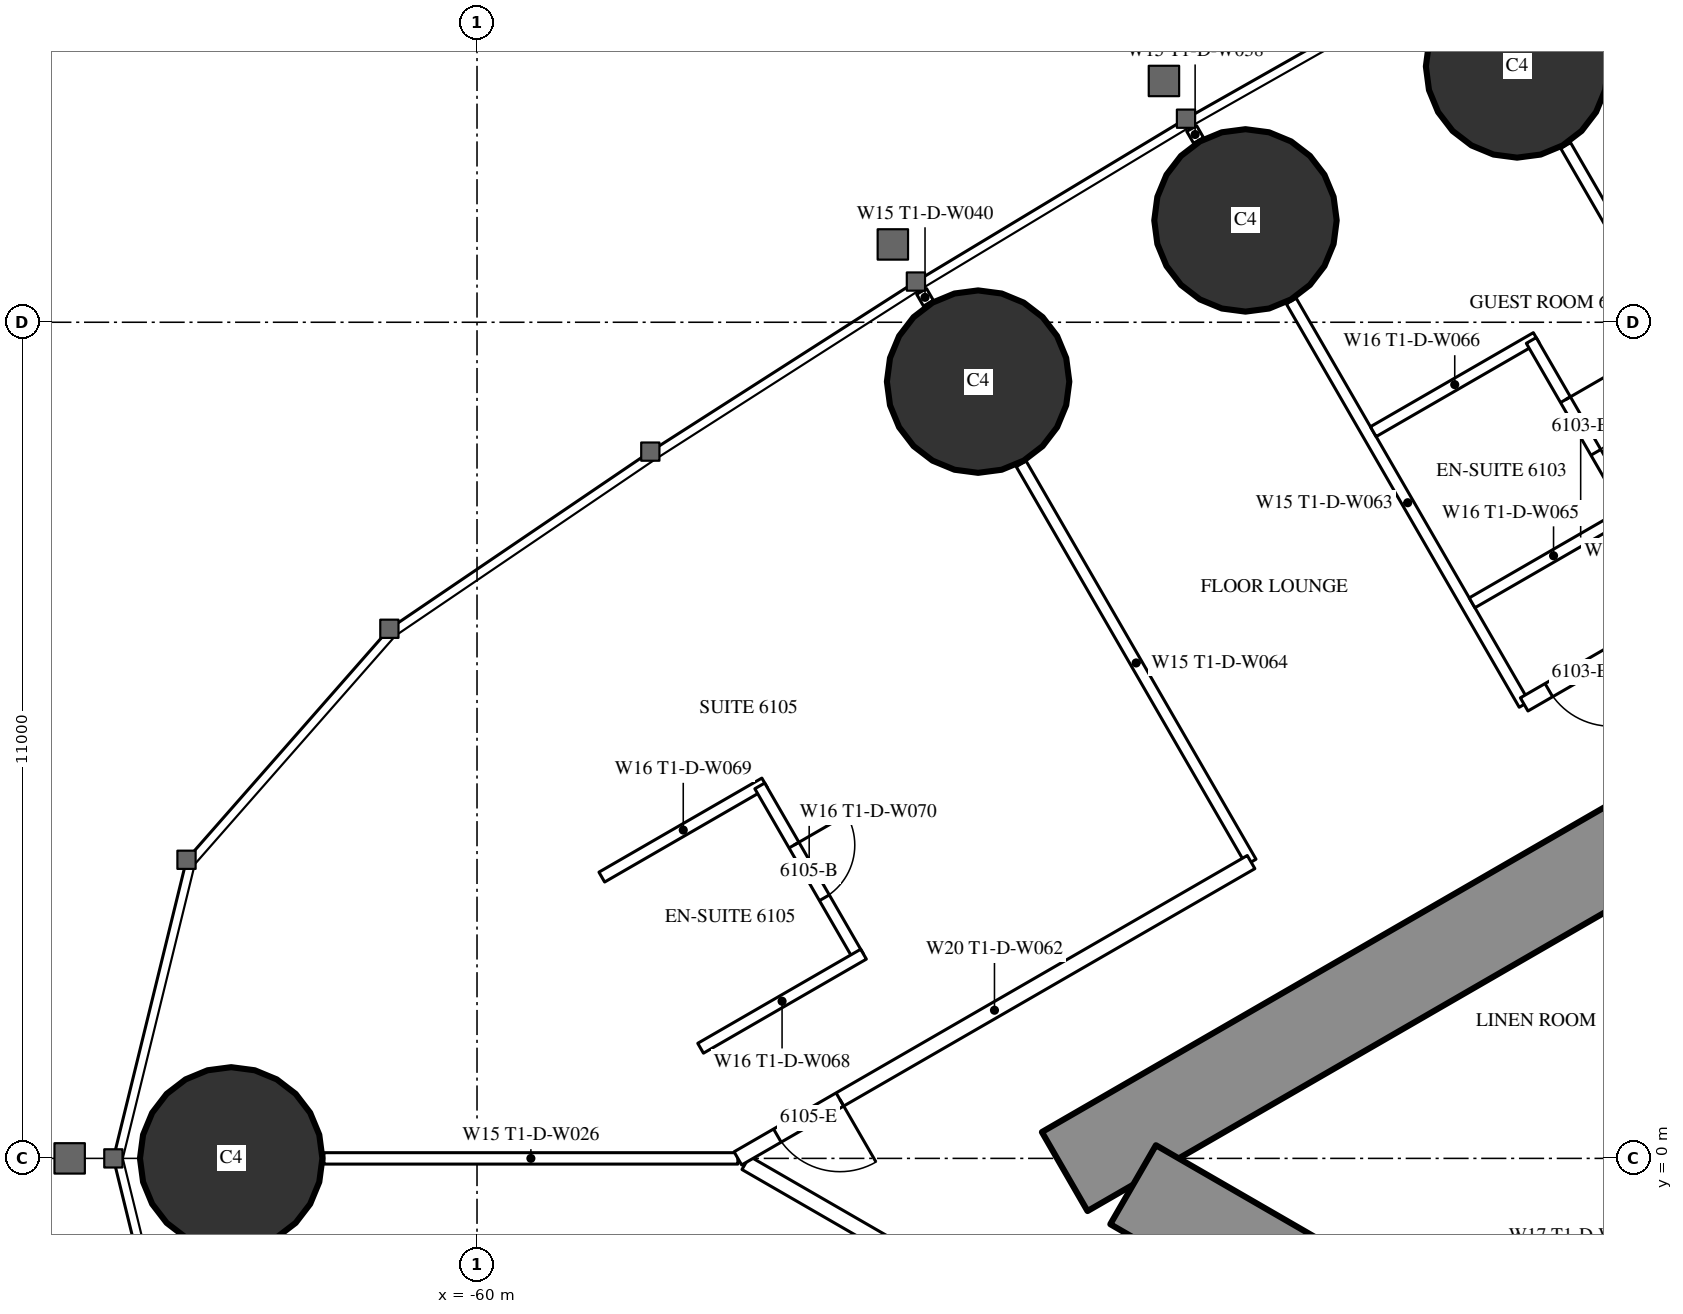
"""IFC4 building model, lengths in metres.
Left out: names, types, materials, properties, quantities, classifications, styles, units other than length and angle.
Written with IfcOpenShell. Run it as: python <this file> out.ifc"""

import sys

from ifc_helpers import new_model, si_unit, direction, frame, frame_2d, origin, origin_2d, place, context, subcontext, project, spatial, rectangle, circle, extrude, element, fill, save


model = new_model("IFC4")
c1 = context("Model", 3, precision=1e-05, world=origin(), true_north=direction((0.0, 1.0)))
c2 = subcontext(c1, "Body", "Model", "MODEL_VIEW")
j1 = project(units=[si_unit("LENGTHUNIT", "METRE"), si_unit("PLANEANGLEUNIT", "RADIAN")], contexts=[c1])
p1 = place(None, origin())
s1 = spatial("IfcSite", under=j1, at=p1, CompositionType="ELEMENT")
p2 = place(p1, origin())
s2 = spatial("IfcBuilding", under=s1, at=p2, CompositionType="ELEMENT")
p3 = place(p2, frame((0.0, 0.0, 229.7)))
s3 = spatial("IfcBuildingStorey", under=s2, at=p3, CompositionType="ELEMENT", Elevation=229.7)
for number, where, z_axis, x_axis in (
    (1, (-63.234, 0.0, 0.0), (0.0, 0.0, 1.0), (1.0, 0.0, 0.0)),
    (2, (-46.317, 14.365, 0.0), (0.0, 0.0, 1.0), (1.0, 0.0, 0.0)),
    (3, (-49.89, 12.34, 0.0), (0.0, 0.0, 1.0), (1.0, 0.0, 0.0)),
    (4, (-53.408, 10.219, 0.0), (0.0, 0.0, 1.0), (1.0, 0.0, 0.0)),
):
    element("IfcColumn", number, at=place(p3, frame(where, z_axis=z_axis, x_axis=x_axis)), inside=s3, PredefinedType="COLUMN", context=c2, shape_type="SweptSolid", body=[
        extrude(circle(Radius=1.2, at=origin_2d()), origin(), (0.0, 0.0, 1.0), 3.6),
    ])
p4 = place(p3, frame((-27.2, 14.3, 0.0), z_axis=(0.0, 0.0, 1.0), x_axis=(-0.866026593062, -0.499997940104, 0.0)))
e5 = element("IfcWall", 5, at=p4, inside=s3, PredefinedType="SHEAR", context=c2, shape_type="SweptSolid", body=[
    extrude(rectangle(XDim=28.946, YDim=1.2, at=frame_2d((14.473, 0.0))), origin(), (0.0, 0.0, 1.0), 3.6),
])
p5 = place(p4, frame((4.6, 0.0, 0.0)))
e6 = element("IfcOpeningElement", 6, at=p5, cuts=e5, PredefinedType="OPENING", context=c2, shape_type="SweptSolid", body=[
    extrude(rectangle(XDim=1.0, YDim=2.2, at=frame_2d((0.5, 1.1))), frame((0.0, 0.61, 0.0), z_axis=(0.0, -1.0, 0.0), x_axis=(1.0, 0.0, 0.0)), (0.0, 0.0, 1.0), 1.22),
])
p6 = place(p4, frame((13.395, 0.0, 0.0)))
e7 = element("IfcOpeningElement", 7, at=p6, cuts=e5, PredefinedType="OPENING", context=c2, shape_type="SweptSolid", body=[
    extrude(rectangle(XDim=1.8, YDim=2.2, at=frame_2d((0.9, 1.1))), frame((0.0, 0.61, 0.0), z_axis=(0.0, -1.0, 0.0), x_axis=(1.0, 0.0, 0.0)), (0.0, 0.0, 1.0), 1.22),
])
p7 = place(p3, frame((-27.2, -14.3, 0.0), z_axis=(0.0, 0.0, 1.0), x_axis=(-0.866024021859, 0.500002393557, 0.0)))
e8 = element("IfcWall", 8, at=p7, inside=s3, PredefinedType="SHEAR", context=c2, shape_type="SweptSolid", body=[
    extrude(rectangle(XDim=27.907, YDim=1.2, at=frame_2d((13.954, 0.0))), origin(), (0.0, 0.0, 1.0), 3.6),
])
p8 = place(p7, frame((4.6, 0.0, 0.0)))
e9 = element("IfcOpeningElement", 9, at=p8, cuts=e8, PredefinedType="OPENING", context=c2, shape_type="SweptSolid", body=[
    extrude(rectangle(XDim=1.0, YDim=2.2, at=frame_2d((0.5, 1.1))), frame((0.0, 0.61, 0.0), z_axis=(0.0, -1.0, 0.0), x_axis=(1.0, 0.0, 0.0)), (0.0, 0.0, 1.0), 1.22),
])
p9 = place(p7, frame((13.395, 0.0, 0.0)))
e10 = element("IfcOpeningElement", 10, at=p9, cuts=e8, PredefinedType="OPENING", context=c2, shape_type="SweptSolid", body=[
    extrude(rectangle(XDim=1.8, YDim=2.2, at=frame_2d((0.9, 1.1))), frame((0.0, 0.61, 0.0), z_axis=(0.0, -1.0, 0.0), x_axis=(1.0, 0.0, 0.0)), (0.0, 0.0, 1.0), 1.22),
])
p10 = place(p3, frame((-42.68, 8.134, 0.0), z_axis=(0.0, 0.0, 1.0), x_axis=(-0.499984479505, 0.866034364361, 0.0)))
e11 = element("IfcWall", 11, at=p10, inside=s3, PredefinedType="PARTITIONING", context=c2, shape_type="SweptSolid", body=[
    extrude(rectangle(XDim=5.995, YDim=0.15, at=frame_2d((2.998, 0.0))), origin(), (0.0, 0.0, 1.0), 2.45),
])
p11 = place(p3, frame((-46.224, 5.972, 0.0), z_axis=(0.0, 0.0, 1.0), x_axis=(-0.500021351822, 0.866013075953, 0.0)))
e12 = element("IfcWall", 12, at=p11, inside=s3, PredefinedType="PARTITIONING", context=c2, shape_type="SweptSolid", body=[
    extrude(rectangle(XDim=6.128, YDim=0.15, at=frame_2d((3.064, 0.0))), origin(), (0.0, 0.0, 1.0), 2.45),
])
p12 = place(p3, frame((-50.508, 13.392, 0.0), z_axis=(0.0, 0.0, 1.0), x_axis=(-0.499644091975, 0.866230789891, 0.0)))
e13 = element("IfcWall", 13, at=p12, inside=s3, PredefinedType="PARTITIONING", context=c2, shape_type="SweptSolid", body=[
    extrude(rectangle(XDim=0.18, YDim=0.15, at=frame_2d((0.09, 0.0))), origin(), (0.0, 0.0, 1.0), 2.45),
])
p13 = place(p3, frame((-49.816, 3.898, 0.0), z_axis=(0.0, 0.0, 1.0), x_axis=(-0.500001913541, 0.866024298998, 0.0)))
e14 = element("IfcWall", 14, at=p13, inside=s3, PredefinedType="PARTITIONING", context=c2, shape_type="SweptSolid", body=[
    extrude(rectangle(XDim=6.05, YDim=0.15, at=frame_2d((3.025, 0.0))), origin(), (0.0, 0.0, 1.0), 2.45),
])
p14 = place(p3, frame((-54.061, 11.25, 0.0), z_axis=(0.0, 0.0, 1.0), x_axis=(-0.500391173478, 0.865799441849, 0.0)))
e15 = element("IfcWall", 15, at=p14, inside=s3, PredefinedType="PARTITIONING", context=c2, shape_type="SweptSolid", body=[
    extrude(rectangle(XDim=0.179, YDim=0.15, at=frame_2d((0.089, 0.0))), origin(), (0.0, 0.0, 1.0), 2.45),
])
p15 = place(p3, frame((-56.568, 0.0, 0.0), z_axis=(0.0, 0.0, 1.0), x_axis=(-1.0, 0.0, 0.0)))
e16 = element("IfcWall", 16, at=p15, inside=s3, PredefinedType="PARTITIONING", context=c2, shape_type="SweptSolid", body=[
    extrude(rectangle(XDim=5.446, YDim=0.15, at=frame_2d((2.723, 0.0))), origin(), (0.0, 0.0, 1.0), 2.45),
])
p16 = place(p3, frame((-44.715, -6.844, 0.0), z_axis=(0.0, 0.0, 1.0), x_axis=(-0.866025261224, 0.500000246922, 0.0)))
e17 = element("IfcWall", 17, at=p16, inside=s3, PredefinedType="PARTITIONING", context=c2, shape_type="SweptSolid", body=[
    extrude(rectangle(XDim=13.567, YDim=0.2, at=frame_2d((6.783, 0.0))), origin(), (0.0, 0.0, 1.0), 3.35),
])
p17 = place(p16, frame((6.266, 0.0, 0.0)))
e18 = element("IfcOpeningElement", 18, at=p17, cuts=e17, PredefinedType="OPENING", context=c2, shape_type="SweptSolid", body=[
    extrude(rectangle(XDim=0.95, YDim=2.2, at=frame_2d((0.475, 1.1))), frame((0.0, 0.11, 0.0), z_axis=(0.0, -1.0, 0.0), x_axis=(1.0, 0.0, 0.0)), (0.0, 0.0, 1.0), 0.22),
])
p18 = place(p16, frame((4.565, 0.0, 0.0)))
e19 = element("IfcOpeningElement", 19, at=p18, cuts=e17, PredefinedType="OPENING", context=c2, shape_type="SweptSolid", body=[
    extrude(rectangle(XDim=0.95, YDim=2.2, at=frame_2d((0.475, 1.1))), frame((0.0, 0.11, 0.0), z_axis=(0.0, -1.0, 0.0), x_axis=(1.0, 0.0, 0.0)), (0.0, 0.0, 1.0), 0.22),
])
p19 = place(p16, frame((0.5, 0.0, 0.0)))
e20 = element("IfcOpeningElement", 20, at=p19, cuts=e17, PredefinedType="OPENING", context=c2, shape_type="SweptSolid", body=[
    extrude(rectangle(XDim=0.967, YDim=2.2, at=frame_2d((0.483, 1.1))), frame((0.0, 0.11, 0.0), z_axis=(0.0, -1.0, 0.0), x_axis=(1.0, 0.0, 0.0)), (0.0, 0.0, 1.0), 0.22),
])
p20 = place(p3, frame((-46.065, 10.798, 0.0), z_axis=(0.0, 0.0, 1.0), x_axis=(-0.866031185235, -0.4999899861, 0.0)))
e21 = element("IfcWall", 21, at=p20, inside=s3, PredefinedType="PARTITIONING", context=c2, shape_type="SweptSolid", body=[
    extrude(rectangle(XDim=2.475, YDim=0.15, at=frame_2d((1.238, 0.0))), origin(), (0.0, 0.0, 1.0), 3.35),
])
p21 = place(p3, frame((-44.83, 8.509, 0.0), z_axis=(0.0, 0.0, 1.0), x_axis=(-0.499936506574, 0.866062058628, 0.0)))
e22 = element("IfcWall", 22, at=p21, inside=s3, PredefinedType="PARTITIONING", context=c2, shape_type="SweptSolid", body=[
    extrude(rectangle(XDim=2.6, YDim=0.15, at=frame_2d((1.3, 0.0))), origin(), (0.0, 0.0, 1.0), 3.35),
])
p22 = place(p21, frame((0.9, 0.0, 0.0)))
e23 = element("IfcOpeningElement", 23, at=p22, cuts=e22, PredefinedType="OPENING", context=c2, shape_type="SweptSolid", body=[
    extrude(rectangle(XDim=0.8, YDim=2.2, at=frame_2d((0.4, 1.1))), frame((0.0, 0.085, 0.0), z_axis=(0.0, -1.0, 0.0), x_axis=(1.0, 0.0, 0.0)), (0.0, 0.0, 1.0), 0.17),
])
for number, where, z_axis, x_axis in (
    (24, (-44.765, 8.546, 0.0), (0.0, 0.0, 1.0), (-0.866, -0.5, 0.0)),
    (25, (-56.215, 4.938, 0.0), (0.0, 0.0, 1.0), (-0.866, -0.5, 0.0)),
):
    element("IfcWall", number, at=place(p3, frame(where, z_axis=z_axis, x_axis=x_axis)), inside=s3, PredefinedType="PARTITIONING", context=c2, shape_type="SweptSolid", body=[
        extrude(rectangle(XDim=2.475, YDim=0.15, at=frame_2d((1.237, 0.0))), origin(), (0.0, 0.0, 1.0), 3.35),
    ])
p23 = place(p3, frame((-54.98, 2.649, 0.0), z_axis=(0.0, 0.0, 1.0), x_axis=(-0.500006934395, 0.866021400173, 0.0)))
e26 = element("IfcWall", 26, at=p23, inside=s3, PredefinedType="PARTITIONING", context=c2, shape_type="SweptSolid", body=[
    extrude(rectangle(XDim=2.6, YDim=0.15, at=frame_2d((1.3, 0.0))), origin(), (0.0, 0.0, 1.0), 3.35),
])
p24 = place(p23, frame((0.9, 0.0, 0.0)))
e27 = element("IfcOpeningElement", 27, at=p24, cuts=e26, PredefinedType="OPENING", context=c2, shape_type="SweptSolid", body=[
    extrude(rectangle(XDim=0.8, YDim=2.2, at=frame_2d((0.4, 1.1))), frame((0.0, 0.085, 0.0), z_axis=(0.0, -1.0, 0.0), x_axis=(1.0, 0.0, 0.0)), (0.0, 0.0, 1.0), 0.17),
])
p25 = place(p3, frame((-54.915, 2.687, 0.0), z_axis=(0.0, 0.0, 1.0), x_axis=(-0.866006523861, -0.500032699561, 0.0)))
e28 = element("IfcWall", 28, at=p25, inside=s3, PredefinedType="PARTITIONING", context=c2, shape_type="SweptSolid", body=[
    extrude(rectangle(XDim=2.475, YDim=0.15, at=frame_2d((1.237, 0.0))), origin(), (0.0, 0.0, 1.0), 3.35),
])
p26 = place(p3, frame((-28.737, 16.068, 0.0), z_axis=(0.0, 0.0, 1.0), x_axis=(-0.866023901326, -0.500002602325, 0.0)))
e29 = element("IfcWall", 29, at=p26, inside=s3, PredefinedType="PARTITIONING", context=c2, shape_type="SweptSolid", body=[
    extrude(rectangle(XDim=20.192, YDim=0.2, at=frame_2d((10.096, 0.0))), origin(), (0.0, 0.0, 1.0), 3.35),
])
p27 = place(p26, frame((1.08, 0.0, 0.0)))
e30 = element("IfcOpeningElement", 30, at=p27, cuts=e29, PredefinedType="OPENING", context=c2, shape_type="SweptSolid", body=[
    extrude(rectangle(XDim=1.8, YDim=2.04, at=frame_2d((0.9, 1.02))), frame((0.0, 0.11, 0.0), z_axis=(0.0, -1.0, 0.0), x_axis=(1.0, 0.0, 0.0)), (0.0, 0.0, 1.0), 0.22),
])
p28 = place(p26, frame((6.86, 0.0, 0.0)))
e31 = element("IfcOpeningElement", 31, at=p28, cuts=e29, PredefinedType="OPENING", context=c2, shape_type="SweptSolid", body=[
    extrude(rectangle(XDim=1.0, YDim=2.2, at=frame_2d((0.5, 1.1))), frame((0.0, 0.11, 0.0), z_axis=(0.0, -1.0, 0.0), x_axis=(1.0, 0.0, 0.0)), (0.0, 0.0, 1.0), 0.22),
])
p29 = place(p26, frame((18.867, 0.0, 0.0)))
e32 = element("IfcOpeningElement", 32, at=p29, cuts=e29, PredefinedType="OPENING", context=c2, shape_type="SweptSolid", body=[
    extrude(rectangle(XDim=0.95, YDim=2.2, at=frame_2d((0.475, 1.1))), frame((0.0, 0.11, 0.0), z_axis=(0.0, -1.0, 0.0), x_axis=(1.0, 0.0, 0.0)), (0.0, 0.0, 1.0), 0.22),
])
p30 = place(p3, frame((-49.816, 3.898, 0.0), z_axis=(0.0, 0.0, 1.0), x_axis=(-0.866028102716, -0.499995325284, 0.0)))
e33 = element("IfcWall", 33, at=p30, inside=s3, PredefinedType="PARTITIONING", context=c2, shape_type="SweptSolid", body=[
    extrude(rectangle(XDim=7.796, YDim=0.2, at=frame_2d((3.898, 0.0))), origin(), (0.0, 0.0, 1.0), 3.35),
])
p31 = place(p30, frame((6.246, 0.0, 0.0)))
e34 = element("IfcOpeningElement", 34, at=p31, cuts=e33, PredefinedType="OPENING", context=c2, shape_type="SweptSolid", body=[
    extrude(rectangle(XDim=0.95, YDim=2.2, at=frame_2d((0.475, 1.1))), frame((0.0, 0.11, 0.0), z_axis=(0.0, -1.0, 0.0), x_axis=(1.0, 0.0, 0.0)), (0.0, 0.0, 1.0), 0.22),
])
p32 = place(p22, origin())
e35 = element("IfcDoor", 35, at=p32, inside=s3, OperationType="SINGLE_SWING_RIGHT", PredefinedType="DOOR", context=c2, shape_type="SweptSolid", body=[
    extrude(rectangle(XDim=0.8, YDim=2.2, at=frame_2d((0.4, 1.1))), frame((0.0, 0.025, 0.0), z_axis=(0.0, -1.0, 0.0), x_axis=(1.0, 0.0, 0.0)), (0.0, 0.0, 1.0), 0.05),
])
fill(e23, e35)
p33 = place(p29, origin())
e36 = element("IfcDoor", 36, at=p33, inside=s3, OperationType="SINGLE_SWING_LEFT", PredefinedType="DOOR", context=c2, shape_type="SweptSolid", body=[
    extrude(rectangle(XDim=0.95, YDim=2.2, at=frame_2d((0.475, 1.1))), frame((0.0, 0.025, 0.0), z_axis=(0.0, -1.0, 0.0), x_axis=(1.0, 0.0, 0.0)), (0.0, 0.0, 1.0), 0.05),
])
fill(e32, e36)
p34 = place(p24, origin())
e37 = element("IfcDoor", 37, at=p34, inside=s3, OperationType="SINGLE_SWING_RIGHT", PredefinedType="DOOR", context=c2, shape_type="SweptSolid", body=[
    extrude(rectangle(XDim=0.8, YDim=2.2, at=frame_2d((0.4, 1.1))), frame((0.0, 0.025, 0.0), z_axis=(0.0, -1.0, 0.0), x_axis=(1.0, 0.0, 0.0)), (0.0, 0.0, 1.0), 0.05),
])
fill(e27, e37)
p35 = place(p31, origin())
e38 = element("IfcDoor", 38, at=p35, inside=s3, OperationType="SINGLE_SWING_LEFT", PredefinedType="DOOR", context=c2, shape_type="SweptSolid", body=[
    extrude(rectangle(XDim=0.95, YDim=2.2, at=frame_2d((0.475, 1.1))), frame((0.0, 0.025, 0.0), z_axis=(0.0, -1.0, 0.0), x_axis=(1.0, 0.0, 0.0)), (0.0, 0.0, 1.0), 0.05),
])
fill(e34, e38)
save(model, sys.argv[1])
